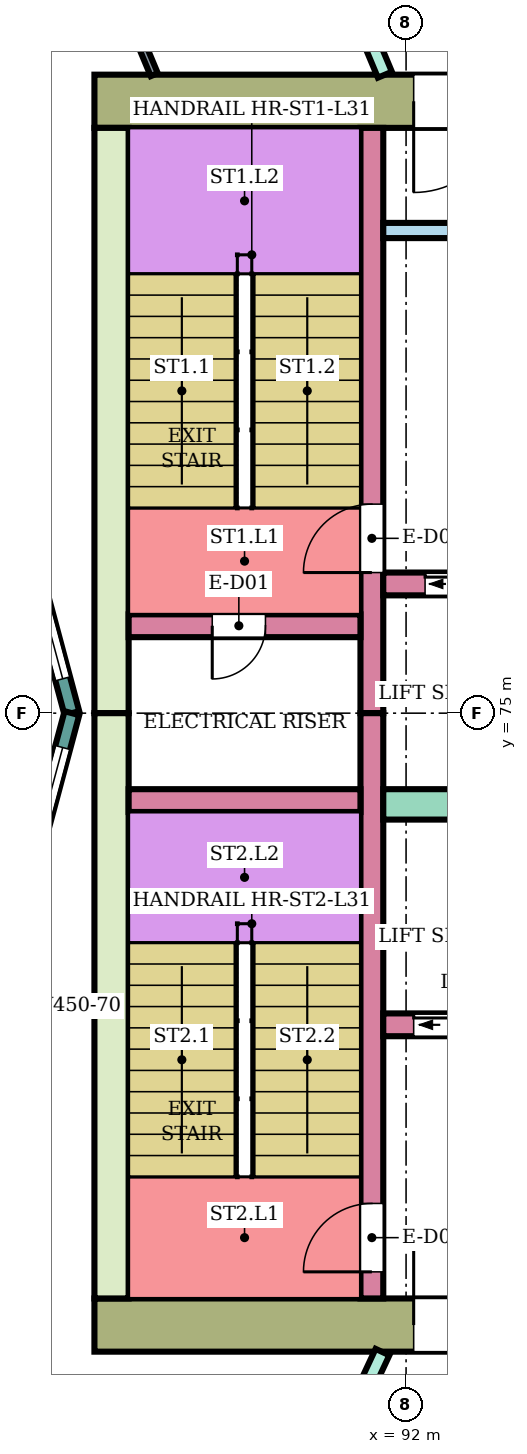
"""IFC4 building model, lengths in metres.
Left out: names, types, materials, properties, quantities, classifications, styles, units other than length and angle.
Written with IfcOpenShell. Run it as: python <this file> out.ifc"""

import sys

from ifc_helpers import new_model, si_unit, direction, frame, frame_2d, origin, place, context, subcontext, project, spatial, rectangle, extrude, element, fill, save


model = new_model("IFC4")
c1 = context("Model", 3, precision=1e-05, world=origin(), true_north=direction((0.0, 1.0)))
c2 = subcontext(c1, "Body", "Model", "MODEL_VIEW")
j1 = project(units=[si_unit("LENGTHUNIT", "METRE"), si_unit("PLANEANGLEUNIT", "RADIAN")], contexts=[c1])
p1 = place(None, origin())
s1 = spatial("IfcSite", under=j1, at=p1, CompositionType="ELEMENT")
p2 = place(p1, origin())
s2 = spatial("IfcBuilding", under=s1, at=p2, CompositionType="ELEMENT")
p3 = place(p2, frame((0.0, 0.0, 134.1)))
s3 = spatial("IfcBuildingStorey", under=s2, at=p3, CompositionType="ELEMENT", Elevation=134.1)
p4 = place(p3, frame((87.9, 83.05, 0.0), z_axis=(0.0, 0.0, 1.0), x_axis=(1.0, 0.0, 0.0)))
e1 = element("IfcWall", 1, at=p4, inside=s3, PredefinedType="SHEAR", context=c2, shape_type="SweptSolid", body=[
    extrude(rectangle(XDim=14.8, YDim=0.7, at=frame_2d((7.4, 0.0))), origin(), (0.0, 0.0, 1.0), 3.58),
])
p5 = place(p4, frame((4.2, 0.0, 0.0)))
e2 = element("IfcOpeningElement", 2, at=p5, cuts=e1, PredefinedType="OPENING", context=c2, shape_type="SweptSolid", body=[
    extrude(rectangle(XDim=2.4, YDim=2.4, at=frame_2d((1.2, 1.2))), frame((0.0, 0.36, 0.0), z_axis=(0.0, -1.0, 0.0), x_axis=(1.0, 0.0, 0.0)), (0.0, 0.0, 1.0), 0.72),
])
p6 = place(p3, frame((87.9, 66.95, 0.0), z_axis=(0.0, 0.0, 1.0), x_axis=(1.0, 0.0, 0.0)))
e3 = element("IfcWall", 3, at=p6, inside=s3, PredefinedType="SHEAR", context=c2, shape_type="SweptSolid", body=[
    extrude(rectangle(XDim=14.8, YDim=0.7, at=frame_2d((7.4, 0.0))), origin(), (0.0, 0.0, 1.0), 3.58),
])
p7 = place(p6, frame((4.2, 0.0, 0.0)))
e4 = element("IfcOpeningElement", 4, at=p7, cuts=e3, PredefinedType="OPENING", context=c2, shape_type="SweptSolid", body=[
    extrude(rectangle(XDim=2.4, YDim=2.4, at=frame_2d((1.2, 1.2))), frame((0.0, 0.36, 0.0), z_axis=(0.0, -1.0, 0.0), x_axis=(1.0, 0.0, 0.0)), (0.0, 0.0, 1.0), 0.72),
])
for number, where, z_axis, x_axis in (
    (5, (88.125, 75.0, 0.0), (0.0, 0.0, 1.0), (0.0, 1.0, 0.0)),
    (6, (88.125, 67.3, 0.0), (0.0, 0.0, 1.0), (0.0, 1.0, 0.0)),
):
    element("IfcWall", number, at=place(p3, frame(where, z_axis=z_axis, x_axis=x_axis)), inside=s3, PredefinedType="SHEAR", context=c2, shape_type="SweptSolid", body=[
        extrude(rectangle(XDim=7.7, YDim=0.45, at=frame_2d((3.85, 0.0))), origin(), (0.0, 0.0, 1.0), 3.58),
    ])
p8 = place(p3, frame((91.55, 75.0, 0.0), z_axis=(0.0, 0.0, 1.0), x_axis=(0.0, 1.0, 0.0)))
e7 = element("IfcWall", 7, at=p8, inside=s3, PredefinedType="SHEAR", context=c2, shape_type="SweptSolid", body=[
    extrude(rectangle(XDim=7.7, YDim=0.3, at=frame_2d((3.85, 0.0))), origin(), (0.0, 0.0, 1.0), 3.58),
])
p9 = place(p8, frame((1.85, 0.0, 0.0)))
e8 = element("IfcOpeningElement", 8, at=p9, cuts=e7, PredefinedType="OPENING", context=c2, shape_type="SweptSolid", body=[
    extrude(rectangle(XDim=0.9, YDim=2.1, at=frame_2d((0.45, 1.05))), frame((0.0, 0.16, 0.0), z_axis=(0.0, -1.0, 0.0), x_axis=(1.0, 0.0, 0.0)), (0.0, 0.0, 1.0), 0.32),
])
p10 = place(p3, frame((91.55, 67.3, 0.0), z_axis=(0.0, 0.0, 1.0), x_axis=(0.0, 1.0, 0.0)))
e9 = element("IfcWall", 9, at=p10, inside=s3, PredefinedType="SHEAR", context=c2, shape_type="SweptSolid", body=[
    extrude(rectangle(XDim=7.7, YDim=0.3, at=frame_2d((3.85, 0.0))), origin(), (0.0, 0.0, 1.0), 3.58),
])
p11 = place(p10, frame((0.35, 0.0, 0.0)))
e10 = element("IfcOpeningElement", 10, at=p11, cuts=e9, PredefinedType="OPENING", context=c2, shape_type="SweptSolid", body=[
    extrude(rectangle(XDim=0.9, YDim=2.1, at=frame_2d((0.45, 1.05))), frame((0.0, 0.16, 0.0), z_axis=(0.0, -1.0, 0.0), x_axis=(1.0, 0.0, 0.0)), (0.0, 0.0, 1.0), 0.32),
])
p12 = place(p3, frame((88.35, 76.15, 0.0), z_axis=(0.0, 0.0, 1.0), x_axis=(1.0, 0.0, 0.0)))
e11 = element("IfcWall", 11, at=p12, inside=s3, PredefinedType="SHEAR", context=c2, shape_type="SweptSolid", body=[
    extrude(rectangle(XDim=3.05, YDim=0.3, at=frame_2d((1.525, 0.0))), origin(), (0.0, 0.0, 1.0), 3.58),
])
p13 = place(p12, frame((1.1, 0.0, 0.0)))
e12 = element("IfcOpeningElement", 12, at=p13, cuts=e11, PredefinedType="OPENING", context=c2, shape_type="SweptSolid", body=[
    extrude(rectangle(XDim=0.7, YDim=2.0, at=frame_2d((0.35, 1.0))), frame((0.0, 0.16, 0.0), z_axis=(0.0, -1.0, 0.0), x_axis=(1.0, 0.0, 0.0)), (0.0, 0.0, 1.0), 0.32),
])
p14 = place(p3, frame((88.35, 73.85, 0.0), z_axis=(0.0, 0.0, 1.0), x_axis=(1.0, 0.0, 0.0)))
e13 = element("IfcWall", 13, at=p14, inside=s3, PredefinedType="SHEAR", context=c2, shape_type="SweptSolid", body=[
    extrude(rectangle(XDim=3.05, YDim=0.3, at=frame_2d((1.525, 0.0))), origin(), (0.0, 0.0, 1.0), 3.58),
])
p15 = place(p3, frame((91.7, 76.7, 0.0), z_axis=(0.0, 0.0, 1.0), x_axis=(1.0, 0.0, 0.0)))
e14 = element("IfcWall", 14, at=p15, inside=s3, PredefinedType="SHEAR", context=c2, shape_type="SweptSolid", body=[
    extrude(rectangle(XDim=11.0, YDim=0.3, at=frame_2d((5.5, 0.0))), origin(), (0.0, 0.0, 1.0), 3.58),
])
p16 = place(p15, frame((0.55, 0.0, 0.0)))
e15 = element("IfcOpeningElement", 15, at=p16, cuts=e14, PredefinedType="OPENING", context=c2, shape_type="SweptSolid", body=[
    extrude(rectangle(XDim=1.1, YDim=2.1, at=frame_2d((0.55, 1.05))), frame((0.0, 0.16, 0.0), z_axis=(0.0, -1.0, 0.0), x_axis=(1.0, 0.0, 0.0)), (0.0, 0.0, 1.0), 0.32),
])
p17 = place(p15, frame((8.1, 0.0, 0.0)))
e16 = element("IfcOpeningElement", 16, at=p17, cuts=e14, PredefinedType="OPENING", context=c2, shape_type="SweptSolid", body=[
    extrude(rectangle(XDim=1.0, YDim=2.1, at=frame_2d((0.5, 1.05))), frame((0.0, 0.16, 0.0), z_axis=(0.0, -1.0, 0.0), x_axis=(1.0, 0.0, 0.0)), (0.0, 0.0, 1.0), 0.32),
])
p18 = place(p3, frame((91.7, 73.8, 0.0), z_axis=(0.0, 0.0, 1.0), x_axis=(1.0, 0.0, 0.0)))
e17 = element("IfcWall", 17, at=p18, inside=s3, PredefinedType="SHEAR", context=c2, shape_type="SweptSolid", body=[
    extrude(rectangle(XDim=11.0, YDim=0.4, at=frame_2d((5.5, 0.0))), origin(), (0.0, 0.0, 1.0), 3.58),
])
p19 = place(p3, frame((91.7, 70.9, 0.0), z_axis=(0.0, 0.0, 1.0), x_axis=(1.0, 0.0, 0.0)))
e18 = element("IfcWall", 18, at=p19, inside=s3, PredefinedType="SHEAR", context=c2, shape_type="SweptSolid", body=[
    extrude(rectangle(XDim=11.0, YDim=0.3, at=frame_2d((5.5, 0.0))), origin(), (0.0, 0.0, 1.0), 3.58),
])
p20 = place(p19, frame((0.4, 0.0, 0.0)))
e19 = element("IfcOpeningElement", 19, at=p20, cuts=e18, PredefinedType="OPENING", context=c2, shape_type="SweptSolid", body=[
    extrude(rectangle(XDim=1.4, YDim=2.1, at=frame_2d((0.7, 1.05))), frame((0.0, 0.16, 0.0), z_axis=(0.0, -1.0, 0.0), x_axis=(1.0, 0.0, 0.0)), (0.0, 0.0, 1.0), 0.32),
])
p21 = place(p19, frame((5.4, 0.0, 0.0)))
e20 = element("IfcOpeningElement", 20, at=p21, cuts=e18, PredefinedType="OPENING", context=c2, shape_type="SweptSolid", body=[
    extrude(rectangle(XDim=1.4, YDim=2.1, at=frame_2d((0.7, 1.05))), frame((0.0, 0.16, 0.0), z_axis=(0.0, -1.0, 0.0), x_axis=(1.0, 0.0, 0.0)), (0.0, 0.0, 1.0), 0.32),
])
p22 = place(p19, frame((8.1, 0.0, 0.0)))
e21 = element("IfcOpeningElement", 21, at=p22, cuts=e18, PredefinedType="OPENING", context=c2, shape_type="SweptSolid", body=[
    extrude(rectangle(XDim=1.0, YDim=2.1, at=frame_2d((0.5, 1.05))), frame((0.0, 0.16, 0.0), z_axis=(0.0, -1.0, 0.0), x_axis=(1.0, 0.0, 0.0)), (0.0, 0.0, 1.0), 0.32),
])
p23 = place(p3, frame((91.7, 81.35, 0.0), z_axis=(0.0, 0.0, 1.0), x_axis=(1.0, 0.0, 0.0)))
e22 = element("IfcWall", 22, at=p23, inside=s3, PredefinedType="SHEAR", context=c2, shape_type="SweptSolid", body=[
    extrude(rectangle(XDim=4.5, YDim=0.2, at=frame_2d((2.25, 0.0))), origin(), (0.0, 0.0, 1.0), 3.58),
])
p24 = place(p3, frame((87.604, 75.0, 0.0), z_axis=(0.0, 0.0, 1.0), x_axis=(-0.258789828301, 0.965933654434, 0.0)))
e23 = element("IfcWall", 23, at=p24, inside=s3, PredefinedType="NOTDEFINED", context=c2, shape_type="SweptSolid", body=[
    extrude(rectangle(XDim=3.936, YDim=0.2, at=frame_2d((1.968, 0.0))), origin(), (0.0, 0.0, 1.0), 3.9),
])
p25 = place(p24, frame((0.468, 0.0, 0.9)))
e24 = element("IfcOpeningElement", 24, at=p25, cuts=e23, PredefinedType="OPENING", context=c2, shape_type="SweptSolid", body=[
    extrude(rectangle(XDim=3.0, YDim=2.3, at=frame_2d((1.5, 1.15))), frame((0.0, 0.11, 0.0), z_axis=(0.0, -1.0, 0.0), x_axis=(1.0, 0.0, 0.0)), (0.0, 0.0, 1.0), 0.22),
])
p26 = place(p3, frame((86.585, 71.198, 0.0), z_axis=(0.0, 0.0, 1.0), x_axis=(0.258789828301, 0.965933654434, 0.0)))
e25 = element("IfcWall", 25, at=p26, inside=s3, PredefinedType="NOTDEFINED", context=c2, shape_type="SweptSolid", body=[
    extrude(rectangle(XDim=3.936, YDim=0.2, at=frame_2d((1.968, 0.0))), origin(), (0.0, 0.0, 1.0), 3.9),
])
p27 = place(p26, frame((0.468, 0.0, 0.9)))
e26 = element("IfcOpeningElement", 26, at=p27, cuts=e25, PredefinedType="OPENING", context=c2, shape_type="SweptSolid", body=[
    extrude(rectangle(XDim=3.0, YDim=2.3, at=frame_2d((1.5, 1.15))), frame((0.0, 0.11, 0.0), z_axis=(0.0, -1.0, 0.0), x_axis=(1.0, 0.0, 0.0)), (0.0, 0.0, 1.0), 0.22),
])
p28 = place(p3, frame((83.85, 81.667, 0.0), z_axis=(0.0, 0.0, 1.0), x_axis=(0.500092047414, 0.865972253663, 0.0)))
e27 = element("IfcWall", 27, at=p28, inside=s3, PredefinedType="PARTITIONING", context=c2, shape_type="SweptSolid", body=[
    extrude(rectangle(XDim=9.778, YDim=0.2, at=frame_2d((4.889, 0.0))), origin(), (0.0, 0.0, 1.0), 3.45),
])
p29 = place(p3, frame((88.502, 59.774, 0.0), z_axis=(0.0, 0.0, 1.0), x_axis=(0.423423307095, 0.905931952747, 0.0)))
e28 = element("IfcWall", 28, at=p29, inside=s3, PredefinedType="PARTITIONING", context=c2, shape_type="SweptSolid", body=[
    extrude(rectangle(XDim=7.529, YDim=0.2, at=frame_2d((3.764, 0.0))), origin(), (0.0, 0.0, 1.0), 3.45),
])
p30 = place(p3, frame((88.698, 90.624, 0.0), z_axis=(0.0, 0.0, 1.0), x_axis=(0.386027055918, -0.922487459047, 0.0)))
e29 = element("IfcWall", 29, at=p30, inside=s3, PredefinedType="PARTITIONING", context=c2, shape_type="SweptSolid", body=[
    extrude(rectangle(XDim=7.832, YDim=0.2, at=frame_2d((3.916, 0.0))), origin(), (0.0, 0.0, 1.0), 3.45),
])
p31 = place(p30, frame((1.482, 0.0, 0.0)))
e30 = element("IfcOpeningElement", 30, at=p31, cuts=e29, PredefinedType="OPENING", context=c2, shape_type="SweptSolid", body=[
    extrude(rectangle(XDim=1.0, YDim=2.1, at=frame_2d((0.5, 1.05))), frame((0.0, 0.11, 0.0), z_axis=(0.0, -1.0, 0.0), x_axis=(1.0, 0.0, 0.0)), (0.0, 0.0, 1.0), 0.22),
])
p32 = place(p3, frame((88.348, 84.209, 0.0), z_axis=(0.0, 0.0, 1.0), x_axis=(0.386077497504, -0.922466349479, 0.0)))
e31 = element("IfcWall", 31, at=p32, inside=s3, PredefinedType="PARTITIONING", context=c2, shape_type="SweptSolid", body=[
    extrude(rectangle(XDim=0.877, YDim=0.1, at=frame_2d((0.438, 0.0))), origin(), (0.0, 0.0, 1.0), 3.45),
])
p33 = place(p25, origin())
e32 = element("IfcWindow", 32, at=p33, inside=s3, PartitioningType="SINGLE_PANEL", PredefinedType="WINDOW", context=c2, shape_type="SweptSolid", body=[
    extrude(rectangle(XDim=3.0, YDim=2.3, at=frame_2d((1.5, 1.15))), frame((0.0, 0.03, 0.0), z_axis=(0.0, -1.0, 0.0), x_axis=(1.0, 0.0, 0.0)), (0.0, 0.0, 1.0), 0.06),
])
fill(e24, e32)
p34 = place(p27, origin())
e33 = element("IfcWindow", 33, at=p34, inside=s3, PartitioningType="SINGLE_PANEL", PredefinedType="WINDOW", context=c2, shape_type="SweptSolid", body=[
    extrude(rectangle(XDim=3.0, YDim=2.3, at=frame_2d((1.5, 1.15))), frame((0.0, 0.03, 0.0), z_axis=(0.0, -1.0, 0.0), x_axis=(1.0, 0.0, 0.0)), (0.0, 0.0, 1.0), 0.06),
])
fill(e26, e33)
p35 = place(p13, frame((0.7, 0.0, 0.0), z_axis=(0.0, 0.0, 1.0), x_axis=(-1.0, 0.0, 0.0)))
e34 = element("IfcDoor", 34, at=p35, inside=s3, OperationType="SINGLE_SWING_RIGHT", PredefinedType="DOOR", context=c2, shape_type="SweptSolid", body=[
    extrude(rectangle(XDim=0.7, YDim=2.0, at=frame_2d((0.35, 1.0))), frame((0.0, 0.025, 0.0), z_axis=(0.0, -1.0, 0.0), x_axis=(1.0, 0.0, 0.0)), (0.0, 0.0, 1.0), 0.05),
])
fill(e12, e34)
p36 = place(p9, origin())
e35 = element("IfcDoor", 35, at=p36, inside=s3, OperationType="SINGLE_SWING_LEFT", PredefinedType="DOOR", context=c2, shape_type="SweptSolid", body=[
    extrude(rectangle(XDim=0.9, YDim=2.1, at=frame_2d((0.45, 1.05))), frame((0.0, 0.025, 0.0), z_axis=(0.0, -1.0, 0.0), x_axis=(1.0, 0.0, 0.0)), (0.0, 0.0, 1.0), 0.05),
])
fill(e8, e35)
p37 = place(p11, origin())
e36 = element("IfcDoor", 36, at=p37, inside=s3, OperationType="SINGLE_SWING_LEFT", PredefinedType="DOOR", context=c2, shape_type="SweptSolid", body=[
    extrude(rectangle(XDim=0.9, YDim=2.1, at=frame_2d((0.45, 1.05))), frame((0.0, 0.025, 0.0), z_axis=(0.0, -1.0, 0.0), x_axis=(1.0, 0.0, 0.0)), (0.0, 0.0, 1.0), 0.05),
])
fill(e10, e36)
p38 = place(p16, origin())
e37 = element("IfcDoor", 37, at=p38, inside=s3, OperationType="DOUBLE_DOOR_SLIDING", PredefinedType="DOOR", context=c2, shape_type="SweptSolid", body=[
    extrude(rectangle(XDim=1.1, YDim=2.1, at=frame_2d((0.55, 1.05))), frame((0.0, 0.025, 0.0), z_axis=(0.0, -1.0, 0.0), x_axis=(1.0, 0.0, 0.0)), (0.0, 0.0, 1.0), 0.05),
])
fill(e15, e37)
p39 = place(p20, origin())
e38 = element("IfcDoor", 38, at=p39, inside=s3, OperationType="DOUBLE_DOOR_SLIDING", PredefinedType="DOOR", context=c2, shape_type="SweptSolid", body=[
    extrude(rectangle(XDim=1.4, YDim=2.1, at=frame_2d((0.7, 1.05))), frame((0.0, 0.025, 0.0), z_axis=(0.0, -1.0, 0.0), x_axis=(1.0, 0.0, 0.0)), (0.0, 0.0, 1.0), 0.05),
])
fill(e19, e38)
p40 = place(p5, frame((2.4, 0.0, 0.0), z_axis=(0.0, 0.0, 1.0), x_axis=(-1.0, 0.0, 0.0)))
e39 = element("IfcDoor", 39, at=p40, inside=s3, OperationType="DOUBLE_DOOR_SINGLE_SWING", PredefinedType="DOOR", context=c2, shape_type="SweptSolid", body=[
    extrude(rectangle(XDim=2.4, YDim=2.4, at=frame_2d((1.2, 1.2))), frame((0.0, 0.025, 0.0), z_axis=(0.0, -1.0, 0.0), x_axis=(1.0, 0.0, 0.0)), (0.0, 0.0, 1.0), 0.05),
])
fill(e2, e39)
p41 = place(p7, origin())
e40 = element("IfcDoor", 40, at=p41, inside=s3, OperationType="DOUBLE_DOOR_SINGLE_SWING", PredefinedType="DOOR", context=c2, shape_type="SweptSolid", body=[
    extrude(rectangle(XDim=2.4, YDim=2.4, at=frame_2d((1.2, 1.2))), frame((0.0, 0.025, 0.0), z_axis=(0.0, -1.0, 0.0), x_axis=(1.0, 0.0, 0.0)), (0.0, 0.0, 1.0), 0.05),
])
fill(e4, e40)
save(model, sys.argv[1])
